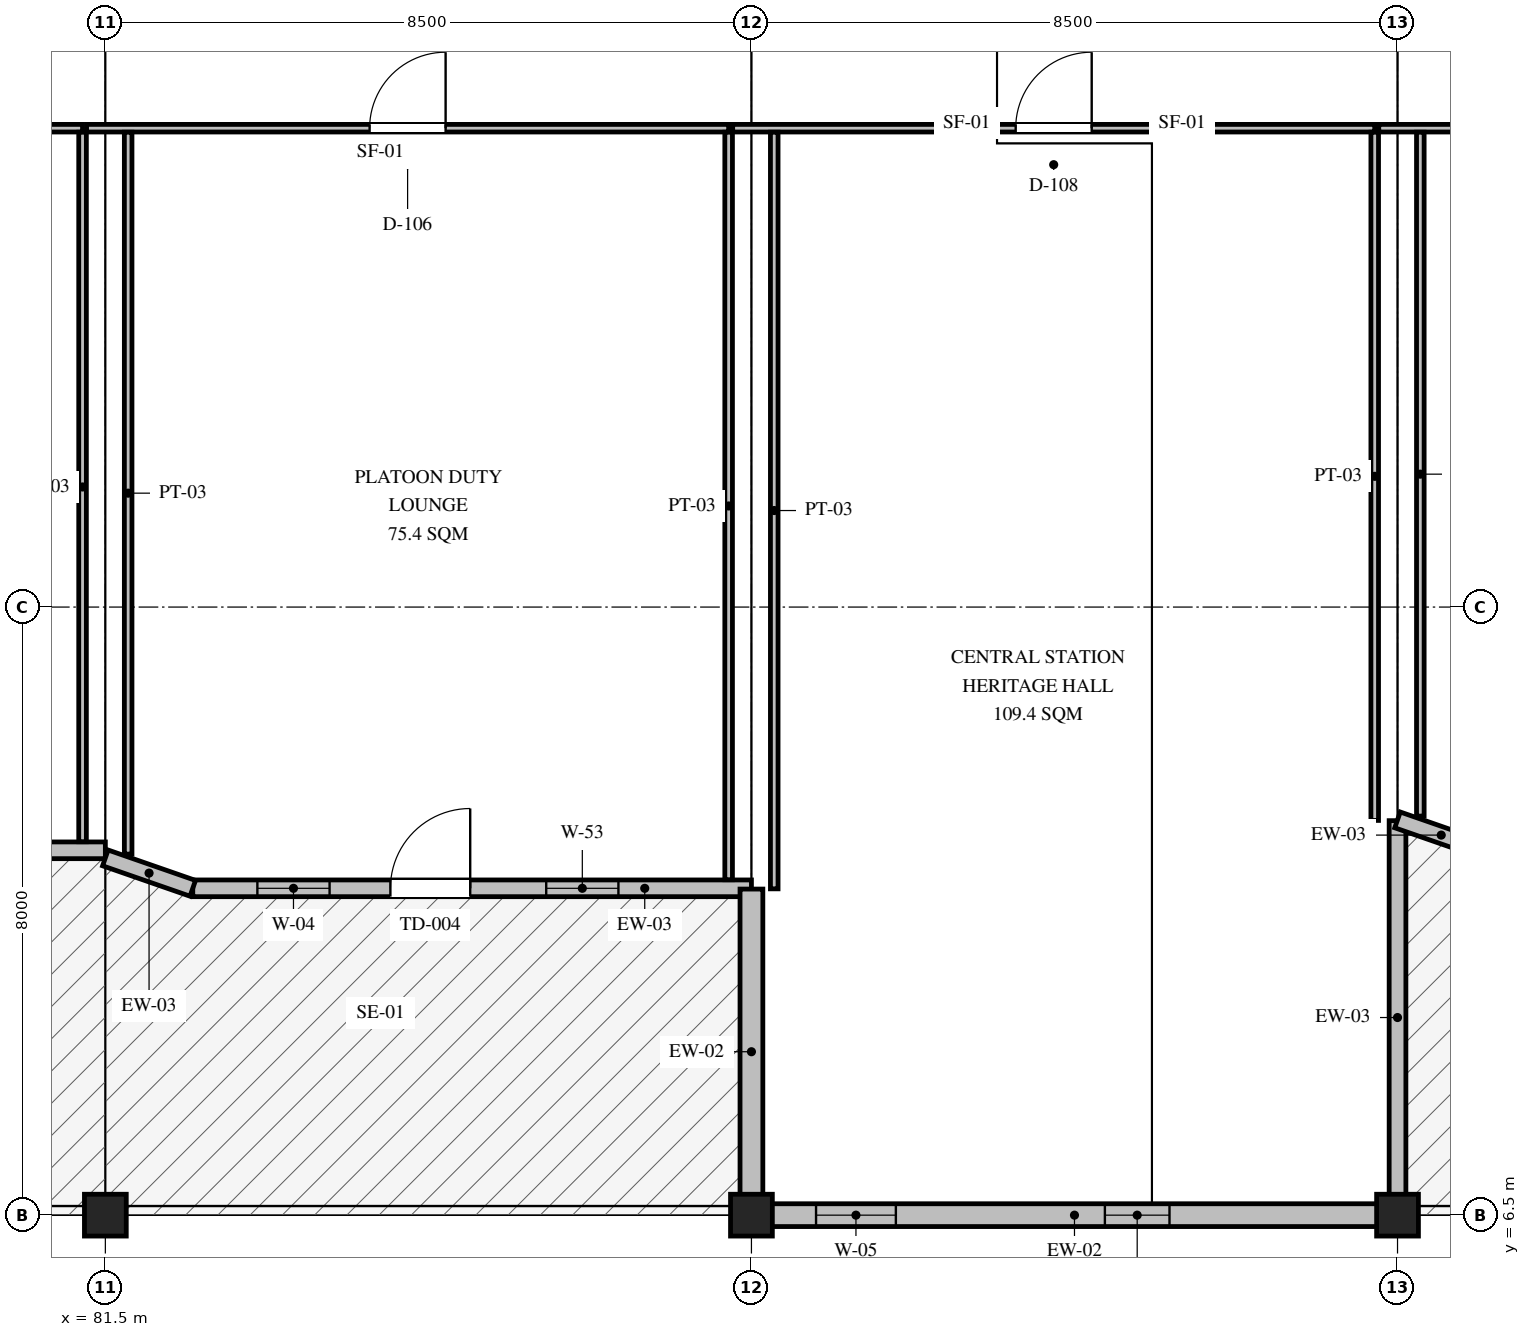
"""IFC4 building model, lengths in metres.
Left out: names, types, materials, properties, quantities, classifications, styles, units other than length and angle.
Written with IfcOpenShell. Run it as: python <this file> out.ifc"""

import sys

from ifc_helpers import new_model, si_unit, direction, frame, frame_2d, origin, origin_2d, place, context, subcontext, project, spatial, polyline, rectangle, hollow_rectangle, outline, extrude, element, fill, save


model = new_model("IFC4")
c1 = context("Model", 3, precision=1e-05, world=origin(), true_north=direction((0.0, 1.0)))
c2 = subcontext(c1, "Body", "Model", "MODEL_VIEW")
j1 = project(units=[si_unit("LENGTHUNIT", "METRE"), si_unit("PLANEANGLEUNIT", "RADIAN")], contexts=[c1])
p1 = place(None, origin())
s1 = spatial("IfcSite", under=j1, at=p1, CompositionType="ELEMENT")
p2 = place(p1, origin())
s2 = spatial("IfcBuilding", under=s1, at=p2, CompositionType="ELEMENT")
p3 = place(p2, frame((0.0, 0.0, 5.85)))
s3 = spatial("IfcBuildingStorey", under=s2, at=p3, CompositionType="ELEMENT", Elevation=5.85)
for number, where, z_axis, x_axis in (
    (1, (81.5, 6.5, 0.0), (0.0, 0.0, 1.0), (1.0, 0.0, 0.0)),
    (2, (90.0, 6.5, 0.0), (0.0, 0.0, 1.0), (1.0, 0.0, 0.0)),
    (3, (98.5, 6.5, 0.0), (0.0, 0.0, 1.0), (1.0, 0.0, 0.0)),
):
    element("IfcColumn", number, at=place(p3, frame(where, z_axis=z_axis, x_axis=x_axis)), inside=s3, PredefinedType="COLUMN", context=c2, shape_type="SweptSolid", body=[
        extrude(hollow_rectangle(XDim=0.55, YDim=0.55, WallThickness=0.026, at=origin_2d()), origin(), (0.0, 0.0, 1.0), 4.2),
    ])
p4 = place(p3, frame((74.15, 11.3, 0.0), z_axis=(0.0, 0.0, 1.0), x_axis=(1.0, 0.0, 0.0)))
e4 = element("IfcWall", 4, at=p4, inside=s3, PredefinedType="SOLIDWALL", context=c2, shape_type="SweptSolid", body=[
    extrude(rectangle(XDim=7.35, YDim=0.22, at=frame_2d((3.675, 0.0))), origin(), (0.0, 0.0, 1.0), 4.0),
])
p5 = place(p4, frame((2.6, 0.0, 0.0)))
e5 = element("IfcOpeningElement", 5, at=p5, cuts=e4, PredefinedType="OPENING", context=c2, shape_type="SweptSolid", body=[
    extrude(rectangle(XDim=1.1, YDim=2.2, at=frame_2d((0.55, 1.1))), frame((0.0, 0.12, 0.0), z_axis=(0.0, -1.0, 0.0), x_axis=(1.0, 0.0, 0.0)), (0.0, 0.0, 1.0), 0.24),
])
p6 = place(p4, frame((0.8, 0.0, 1.1)))
e6 = element("IfcOpeningElement", 6, at=p6, cuts=e4, PredefinedType="OPENING", context=c2, shape_type="SweptSolid", body=[
    extrude(rectangle(XDim=0.85, YDim=0.85, at=frame_2d((0.425, 0.425))), frame((0.0, 0.12, 0.0), z_axis=(0.0, -1.0, 0.0), x_axis=(1.0, 0.0, 0.0)), (0.0, 0.0, 1.0), 0.24),
])
p7 = place(p4, frame((4.55, 0.0, 1.35)))
e7 = element("IfcOpeningElement", 7, at=p7, cuts=e4, PredefinedType="OPENING", context=c2, shape_type="SweptSolid", body=[
    extrude(rectangle(XDim=1.85, YDim=1.65, at=frame_2d((0.925, 0.825))), frame((0.0, 0.12, 0.0), z_axis=(0.0, -1.0, 0.0), x_axis=(1.0, 0.0, 0.0)), (0.0, 0.0, 1.0), 0.24),
])
p8 = place(p3, frame((82.65, 10.8, 0.0), z_axis=(0.0, 0.0, 1.0), x_axis=(1.0, 0.0, 0.0)))
e8 = element("IfcWall", 8, at=p8, inside=s3, PredefinedType="SOLIDWALL", context=c2, shape_type="SweptSolid", body=[
    extrude(outline(polyline([(0.0, 0.0), (7.35, 0.0), (7.35, 3.95), (2.42, 11.42), (0.0, 3.95), (0.0, 0.0)])), frame((0.0, 0.11, 0.0), z_axis=(0.0, -1.0, 0.0), x_axis=(1.0, 0.0, 0.0)), (0.0, 0.0, 1.0), 0.22),
])
p9 = place(p8, frame((2.6, 0.0, 0.0)))
e9 = element("IfcOpeningElement", 9, at=p9, cuts=e8, PredefinedType="OPENING", context=c2, shape_type="SweptSolid", body=[
    extrude(rectangle(XDim=1.05, YDim=2.15, at=frame_2d((0.525, 1.075))), frame((0.0, 0.12, 0.0), z_axis=(0.0, -1.0, 0.0), x_axis=(1.0, 0.0, 0.0)), (0.0, 0.0, 1.0), 0.24),
])
p10 = place(p8, frame((0.85, 0.0, 1.1)))
e10 = element("IfcOpeningElement", 10, at=p10, cuts=e8, PredefinedType="OPENING", context=c2, shape_type="SweptSolid", body=[
    extrude(rectangle(XDim=0.95, YDim=0.95, at=frame_2d((0.475, 0.475))), frame((0.0, 0.12, 0.0), z_axis=(0.0, -1.0, 0.0), x_axis=(1.0, 0.0, 0.0)), (0.0, 0.0, 1.0), 0.24),
])
p11 = place(p8, frame((4.65, 0.0, 1.55)))
e11 = element("IfcOpeningElement", 11, at=p11, cuts=e8, PredefinedType="OPENING", context=c2, shape_type="SweptSolid", body=[
    extrude(rectangle(XDim=0.95, YDim=1.65, at=frame_2d((0.475, 0.825))), frame((0.0, 0.12, 0.0), z_axis=(0.0, -1.0, 0.0), x_axis=(1.0, 0.0, 0.0)), (0.0, 0.0, 1.0), 0.24),
])
p12 = place(p3, frame((81.5, 11.2, 0.0), z_axis=(0.0, 0.0, 1.0), x_axis=(0.944513027611, -0.328473957373, 0.0)))
e12 = element("IfcWall", 12, at=p12, inside=s3, PredefinedType="SOLIDWALL", context=c2, shape_type="SweptSolid", body=[
    extrude(outline(polyline([(0.0, 0.0), (1.218, 0.0), (1.218, 3.95), (0.0, 3.95), (0.0, 0.0)])), frame((0.0, 0.11, 0.0), z_axis=(0.0, -1.0, 0.0), x_axis=(1.0, 0.0, 0.0)), (0.0, 0.0, 1.0), 0.22),
])
p13 = place(p3, frame((90.0, 6.51, 0.0), z_axis=(0.0, 0.0, 1.0), x_axis=(0.0, 1.0, 0.0)))
e13 = element("IfcWall", 13, at=p13, inside=s3, PredefinedType="SOLIDWALL", context=c2, shape_type="SweptSolid", body=[
    extrude(rectangle(XDim=4.28, YDim=0.3, at=frame_2d((2.14, 0.0))), origin(), (0.0, 0.0, 1.0), 3.59),
])
p14 = place(p3, frame((90.0, 6.5, 0.0), z_axis=(0.0, 0.0, 1.0), x_axis=(1.0, 0.0, 0.0)))
e14 = element("IfcWall", 14, at=p14, inside=s3, PredefinedType="SOLIDWALL", context=c2, shape_type="SweptSolid", body=[
    extrude(outline(polyline([(0.0, 0.0), (8.5, 0.0), (8.5, 3.95), (3.57, 13.02), (0.0, 3.95), (0.0, 0.0)])), frame((0.0, 0.15, 0.0), z_axis=(0.0, -1.0, 0.0), x_axis=(1.0, 0.0, 0.0)), (0.0, 0.0, 1.0), 0.3),
])
p15 = place(p14, frame((0.85, 0.0, 1.1)))
e15 = element("IfcOpeningElement", 15, at=p15, cuts=e14, PredefinedType="OPENING", context=c2, shape_type="SweptSolid", body=[
    extrude(rectangle(XDim=1.05, YDim=1.05, at=frame_2d((0.525, 0.525))), frame((0.0, 0.16, 0.0), z_axis=(0.0, -1.0, 0.0), x_axis=(1.0, 0.0, 0.0)), (0.0, 0.0, 1.0), 0.32),
])
p16 = place(p14, frame((4.65, 0.0, 1.55)))
e16 = element("IfcOpeningElement", 16, at=p16, cuts=e14, PredefinedType="OPENING", context=c2, shape_type="SweptSolid", body=[
    extrude(rectangle(XDim=0.85, YDim=1.45, at=frame_2d((0.425, 0.725))), frame((0.0, 0.16, 0.0), z_axis=(0.0, -1.0, 0.0), x_axis=(1.0, 0.0, 0.0)), (0.0, 0.0, 1.0), 0.32),
])
p17 = place(p3, frame((98.5, 6.51, 0.0), z_axis=(0.0, 0.0, 1.0), x_axis=(0.0, 1.0, 0.0)))
e17 = element("IfcWall", 17, at=p17, inside=s3, PredefinedType="SOLIDWALL", context=c2, shape_type="SweptSolid", body=[
    extrude(rectangle(XDim=5.18, YDim=0.22, at=frame_2d((2.59, 0.0))), origin(), (0.0, 0.0, 1.0), 3.59),
])
p18 = place(p3, frame((98.5, 11.7, 0.0), z_axis=(0.0, 0.0, 1.0), x_axis=(0.944513027611, -0.328473957373, 0.0)))
e18 = element("IfcWall", 18, at=p18, inside=s3, PredefinedType="SOLIDWALL", context=c2, shape_type="SweptSolid", body=[
    extrude(outline(polyline([(0.0, 0.0), (1.218, 0.0), (1.218, 3.95), (0.0, 3.95), (0.0, 0.0)])), frame((0.0, 0.11, 0.0), z_axis=(0.0, -1.0, 0.0), x_axis=(1.0, 0.0, 0.0)), (0.0, 0.0, 1.0), 0.22),
])
p19 = place(p3, frame((72.753, 20.8, 0.0), z_axis=(0.0, 0.0, 1.0), x_axis=(1.0, 0.0, 0.0)))
e19 = element("IfcWall", 19, at=p19, inside=s3, PredefinedType="PARTITIONING", context=c2, shape_type="SweptSolid", body=[
    extrude(rectangle(XDim=8.447, YDim=0.1, at=frame_2d((4.224, 0.0))), origin(), (0.0, 0.0, 1.0), 3.544),
])
p20 = place(p19, frame((3.723, 0.0, 0.0)))
e20 = element("IfcOpeningElement", 20, at=p20, cuts=e19, PredefinedType="OPENING", context=c2, shape_type="SweptSolid", body=[
    extrude(rectangle(XDim=1.0, YDim=2.1, at=frame_2d((0.5, 1.05))), frame((0.0, 0.06, 0.0), z_axis=(0.0, -1.0, 0.0), x_axis=(1.0, 0.0, 0.0)), (0.0, 0.0, 1.0), 0.12),
])
p21 = place(p3, frame((81.2, 11.413, 0.0), z_axis=(0.0, 0.0, 1.0), x_axis=(0.0, 1.0, 0.0)))
e21 = element("IfcWall", 21, at=p21, inside=s3, PredefinedType="PARTITIONING", context=c2, shape_type="SweptSolid", body=[
    extrude(rectangle(XDim=9.334, YDim=0.1, at=frame_2d((4.667, 0.0))), origin(), (0.0, 0.0, 1.0), 3.594),
])
p22 = place(p3, frame((81.253, 20.8, 0.0), z_axis=(0.0, 0.0, 1.0), x_axis=(1.0, 0.0, 0.0)))
e22 = element("IfcWall", 22, at=p22, inside=s3, PredefinedType="PARTITIONING", context=c2, shape_type="SweptSolid", body=[
    extrude(rectangle(XDim=8.447, YDim=0.1, at=frame_2d((4.224, 0.0))), origin(), (0.0, 0.0, 1.0), 3.544),
])
p23 = place(p22, frame((3.723, 0.0, 0.0)))
e23 = element("IfcOpeningElement", 23, at=p23, cuts=e22, PredefinedType="OPENING", context=c2, shape_type="SweptSolid", body=[
    extrude(rectangle(XDim=1.0, YDim=2.1, at=frame_2d((0.5, 1.05))), frame((0.0, 0.06, 0.0), z_axis=(0.0, -1.0, 0.0), x_axis=(1.0, 0.0, 0.0)), (0.0, 0.0, 1.0), 0.12),
])
p24 = place(p3, frame((81.8, 11.25, 0.0), z_axis=(0.0, 0.0, 1.0), x_axis=(0.0, 1.0, 0.0)))
e24 = element("IfcWall", 24, at=p24, inside=s3, PredefinedType="PARTITIONING", context=c2, shape_type="SweptSolid", body=[
    extrude(rectangle(XDim=9.497, YDim=0.1, at=frame_2d((4.749, 0.0))), origin(), (0.0, 0.0, 1.0), 3.594),
])
p25 = place(p3, frame((89.7, 10.913, 0.0), z_axis=(0.0, 0.0, 1.0), x_axis=(0.0, 1.0, 0.0)))
e25 = element("IfcWall", 25, at=p25, inside=s3, PredefinedType="PARTITIONING", context=c2, shape_type="SweptSolid", body=[
    extrude(rectangle(XDim=9.834, YDim=0.1, at=frame_2d((4.917, 0.0))), origin(), (0.0, 0.0, 1.0), 3.594),
])
p26 = place(p3, frame((89.753, 20.8, 0.0), z_axis=(0.0, 0.0, 1.0), x_axis=(1.0, 0.0, 0.0)))
e26 = element("IfcWall", 26, at=p26, inside=s3, PredefinedType="PARTITIONING", context=c2, shape_type="SweptSolid", body=[
    extrude(rectangle(XDim=8.447, YDim=0.1, at=frame_2d((4.224, 0.0))), origin(), (0.0, 0.0, 1.0), 3.544),
])
p27 = place(p26, frame((3.723, 0.0, 0.0)))
e27 = element("IfcOpeningElement", 27, at=p27, cuts=e26, PredefinedType="OPENING", context=c2, shape_type="SweptSolid", body=[
    extrude(rectangle(XDim=1.0, YDim=2.1, at=frame_2d((0.5, 1.05))), frame((0.0, 0.06, 0.0), z_axis=(0.0, -1.0, 0.0), x_axis=(1.0, 0.0, 0.0)), (0.0, 0.0, 1.0), 0.12),
])
p28 = place(p3, frame((90.3, 10.793, 0.0), z_axis=(0.0, 0.0, 1.0), x_axis=(0.0, 1.0, 0.0)))
e28 = element("IfcWall", 28, at=p28, inside=s3, PredefinedType="PARTITIONING", context=c2, shape_type="SweptSolid", body=[
    extrude(rectangle(XDim=9.954, YDim=0.1, at=frame_2d((4.977, 0.0))), origin(), (0.0, 0.0, 1.0), 3.594),
])
p29 = place(p3, frame((98.2, 11.693, 0.0), z_axis=(0.0, 0.0, 1.0), x_axis=(0.0, 1.0, 0.0)))
e29 = element("IfcWall", 29, at=p29, inside=s3, PredefinedType="PARTITIONING", context=c2, shape_type="SweptSolid", body=[
    extrude(rectangle(XDim=9.054, YDim=0.1, at=frame_2d((4.527, 0.0))), origin(), (0.0, 0.0, 1.0), 3.594),
])
p30 = place(p3, frame((98.253, 20.8, 0.0), z_axis=(0.0, 0.0, 1.0), x_axis=(1.0, 0.0, 0.0)))
e30 = element("IfcWall", 30, at=p30, inside=s3, PredefinedType="PARTITIONING", context=c2, shape_type="SweptSolid", body=[
    extrude(rectangle(XDim=8.447, YDim=0.1, at=frame_2d((4.224, 0.0))), origin(), (0.0, 0.0, 1.0), 3.544),
])
p31 = place(p30, frame((3.723, 0.0, 0.0)))
e31 = element("IfcOpeningElement", 31, at=p31, cuts=e30, PredefinedType="OPENING", context=c2, shape_type="SweptSolid", body=[
    extrude(rectangle(XDim=1.0, YDim=2.1, at=frame_2d((0.5, 1.05))), frame((0.0, 0.06, 0.0), z_axis=(0.0, -1.0, 0.0), x_axis=(1.0, 0.0, 0.0)), (0.0, 0.0, 1.0), 0.12),
])
p32 = place(p3, frame((98.8, 11.75, 0.0), z_axis=(0.0, 0.0, 1.0), x_axis=(0.0, 1.0, 0.0)))
e32 = element("IfcWall", 32, at=p32, inside=s3, PredefinedType="PARTITIONING", context=c2, shape_type="SweptSolid", body=[
    extrude(rectangle(XDim=8.997, YDim=0.1, at=frame_2d((4.499, 0.0))), origin(), (0.0, 0.0, 1.0), 3.594),
])
p33 = place(p9, frame((1.05, 0.0, 0.0), z_axis=(0.0, 0.0, 1.0), x_axis=(-1.0, 0.0, 0.0)))
e33 = element("IfcDoor", 33, at=p33, inside=s3, OperationType="SINGLE_SWING_RIGHT", PredefinedType="DOOR", context=c2, shape_type="SweptSolid", body=[
    extrude(rectangle(XDim=1.05, YDim=2.15, at=frame_2d((0.525, 1.075))), frame((0.0, 0.025, 0.0), z_axis=(0.0, -1.0, 0.0), x_axis=(1.0, 0.0, 0.0)), (0.0, 0.0, 1.0), 0.05),
])
fill(e9, e33)
p34 = place(p10, origin())
e34 = element("IfcWindow", 34, at=p34, inside=s3, PartitioningType="SINGLE_PANEL", PredefinedType="WINDOW", context=c2, shape_type="SweptSolid", body=[
    extrude(rectangle(XDim=0.95, YDim=0.95, at=frame_2d((0.475, 0.475))), frame((0.0, 0.03, 0.0), z_axis=(0.0, -1.0, 0.0), x_axis=(1.0, 0.0, 0.0)), (0.0, 0.0, 1.0), 0.06),
])
fill(e10, e34)
p35 = place(p11, origin())
e35 = element("IfcWindow", 35, at=p35, inside=s3, PartitioningType="SINGLE_PANEL", PredefinedType="WINDOW", context=c2, shape_type="SweptSolid", body=[
    extrude(rectangle(XDim=0.95, YDim=1.65, at=frame_2d((0.475, 0.825))), frame((0.0, 0.03, 0.0), z_axis=(0.0, -1.0, 0.0), x_axis=(1.0, 0.0, 0.0)), (0.0, 0.0, 1.0), 0.06),
])
fill(e11, e35)
p36 = place(p15, origin())
e36 = element("IfcWindow", 36, at=p36, inside=s3, PartitioningType="SINGLE_PANEL", PredefinedType="WINDOW", context=c2, shape_type="SweptSolid", body=[
    extrude(rectangle(XDim=1.05, YDim=1.05, at=frame_2d((0.525, 0.525))), frame((0.0, 0.03, 0.0), z_axis=(0.0, -1.0, 0.0), x_axis=(1.0, 0.0, 0.0)), (0.0, 0.0, 1.0), 0.06),
])
fill(e15, e36)
p37 = place(p16, origin())
e37 = element("IfcWindow", 37, at=p37, inside=s3, PartitioningType="SINGLE_PANEL", PredefinedType="WINDOW", context=c2, shape_type="SweptSolid", body=[
    extrude(rectangle(XDim=0.85, YDim=1.45, at=frame_2d((0.425, 0.725))), frame((0.0, 0.03, 0.0), z_axis=(0.0, -1.0, 0.0), x_axis=(1.0, 0.0, 0.0)), (0.0, 0.0, 1.0), 0.06),
])
fill(e16, e37)
p38 = place(p23, origin())
e38 = element("IfcDoor", 38, at=p38, inside=s3, OperationType="SINGLE_SWING_RIGHT", PredefinedType="DOOR", context=c2, shape_type="SweptSolid", body=[
    extrude(rectangle(XDim=1.0, YDim=2.1, at=frame_2d((0.5, 1.05))), frame((0.0, 0.025, 0.0), z_axis=(0.0, -1.0, 0.0), x_axis=(1.0, 0.0, 0.0)), (0.0, 0.0, 1.0), 0.05),
])
fill(e23, e38)
p39 = place(p27, origin())
e39 = element("IfcDoor", 39, at=p39, inside=s3, OperationType="SINGLE_SWING_RIGHT", PredefinedType="DOOR", context=c2, shape_type="SweptSolid", body=[
    extrude(rectangle(XDim=1.0, YDim=2.1, at=frame_2d((0.5, 1.05))), frame((0.0, 0.025, 0.0), z_axis=(0.0, -1.0, 0.0), x_axis=(1.0, 0.0, 0.0)), (0.0, 0.0, 1.0), 0.05),
])
fill(e27, e39)
save(model, sys.argv[1])
